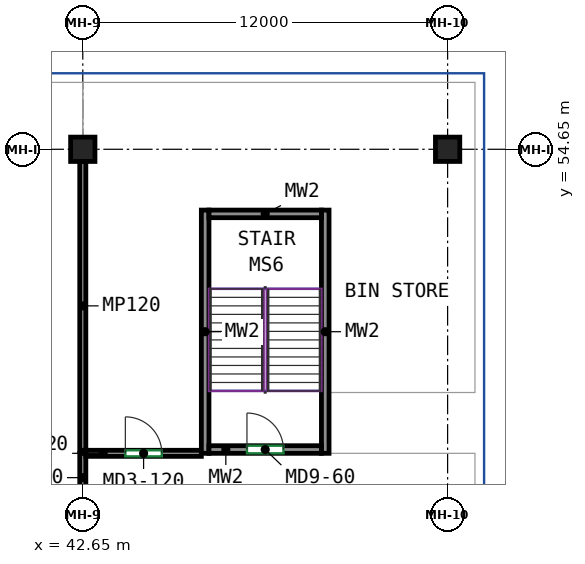
"""IFC4 building model, lengths in metres.
Left out: names, types, materials, properties, quantities, classifications, styles, units other than length and angle.
Written with IfcOpenShell. Run it as: python <this file> out.ifc"""

import sys

from ifc_helpers import new_model, si_unit, direction, frame, frame_2d, origin, origin_2d, place, context, subcontext, project, spatial, rectangle, extrude, source, transform, mapped, element, fill, save


model = new_model("IFC4")
c1 = context("Model", 3, precision=1e-05, world=origin(), true_north=direction((0.0, 1.0)))
c2 = subcontext(c1, "Body", "Model", "MODEL_VIEW")
j1 = project(units=[si_unit("LENGTHUNIT", "METRE"), si_unit("PLANEANGLEUNIT", "RADIAN")], contexts=[c1])
p1 = place(None, origin())
s1 = spatial("IfcSite", under=j1, at=p1, CompositionType="ELEMENT")
p2 = place(p1, origin())
s2 = spatial("IfcBuilding", under=s1, at=p2, CompositionType="ELEMENT")
p3 = place(p2, frame((0.0, 0.0, 9.0)))
s3 = spatial("IfcBuildingStorey", under=s2, at=p3, CompositionType="ELEMENT", Elevation=9.0)
m1 = source(origin(), c2, "Body", "SweptSolid", [
    extrude(rectangle(XDim=0.8, YDim=0.8, at=origin_2d()), origin(), (0.0, 0.0, 1.0), 4.1),
])
for number, where, z_axis, x_axis in (
    (1, (42.65, 54.65, 0.0), (0.0, 0.0, 1.0), (1.0, 0.0, 0.0)),
    (2, (54.65, 54.65, 0.0), (0.0, 0.0, 1.0), (1.0, 0.0, 0.0)),
):
    element("IfcColumn", number, at=place(p3, frame(where, z_axis=z_axis, x_axis=x_axis)), inside=s3, PredefinedType="COLUMN", context=c2, shape_type="MappedRepresentation", body=[
        mapped(m1, transform((0.0, 0.0, 0.0))),
    ])
m2 = source(origin(), c2, "Body", "SweptSolid", [
    extrude(rectangle(XDim=8.0, YDim=0.25, at=frame_2d((4.0, 0.0))), origin(), (0.0, 0.0, 1.0), 4.1),
])
for number, where, z_axis, x_axis in (
    (3, (46.675, 44.65, 0.0), (0.0, 0.0, 1.0), (0.0, 1.0, 0.0)),
    (4, (50.625, 44.65, 0.0), (0.0, 0.0, 1.0), (0.0, 1.0, 0.0)),
):
    element("IfcWall", number, at=place(p3, frame(where, z_axis=z_axis, x_axis=x_axis)), inside=s3, PredefinedType="SHEAR", context=c2, shape_type="MappedRepresentation", body=[
        mapped(m2, transform((0.0, 0.0, 0.0))),
    ])
m3 = source(origin(), c2, "Body", "SweptSolid", [
    extrude(rectangle(XDim=3.7, YDim=0.25, at=frame_2d((1.85, 0.0))), origin(), (0.0, 0.0, 1.0), 4.1),
])
p4 = place(p3, frame((46.8, 44.775, 0.0), z_axis=(0.0, 0.0, 1.0), x_axis=(1.0, 0.0, 0.0)))
e5 = element("IfcWall", 5, at=p4, inside=s3, PredefinedType="SHEAR", context=c2, shape_type="MappedRepresentation", body=[
    mapped(m3, transform((0.0, 0.0, 0.0))),
])
p5 = place(p4, frame((1.25, 0.0, 0.0)))
e6 = element("IfcOpeningElement", 6, at=p5, cuts=e5, PredefinedType="OPENING", context=c2, shape_type="SweptSolid", body=[
    extrude(rectangle(XDim=1.2, YDim=2.1, at=frame_2d((0.6, 1.05))), frame((0.0, 0.135, 0.0), z_axis=(0.0, -1.0, 0.0), x_axis=(1.0, 0.0, 0.0)), (0.0, 0.0, 1.0), 0.27),
])
p6 = place(p3, frame((46.8, 52.525, 0.0), z_axis=(0.0, 0.0, 1.0), x_axis=(1.0, 0.0, 0.0)))
e7 = element("IfcWall", 7, at=p6, inside=s3, PredefinedType="SHEAR", context=c2, shape_type="MappedRepresentation", body=[
    mapped(m3, transform((0.0, 0.0, 0.0))),
])
m4 = source(origin(), c2, "Body", "SweptSolid", [
    extrude(rectangle(XDim=112.7, YDim=0.3, at=frame_2d((56.35, 0.0))), origin(), (0.0, 0.0, 1.0), 4.1),
])
p7 = place(p3, frame((-56.85, 57.0, 0.0), z_axis=(0.0, 0.0, 1.0), x_axis=(1.0, 0.0, 0.0)))
e8 = element("IfcWall", 8, at=p7, inside=s3, PredefinedType="SOLIDWALL", context=c2, shape_type="MappedRepresentation", body=[
    mapped(m4, transform((0.0, 0.0, 0.0))),
])
p8 = place(p7, frame((3.15, 0.0, 0.9)))
e9 = element("IfcOpeningElement", 9, at=p8, cuts=e8, PredefinedType="OPENING", context=c2, shape_type="SweptSolid", body=[
    extrude(rectangle(XDim=2.4, YDim=1.8, at=frame_2d((1.2, 0.9))), frame((0.0, 0.16, 0.0), z_axis=(0.0, -1.0, 0.0), x_axis=(1.0, 0.0, 0.0)), (0.0, 0.0, 1.0), 0.32),
])
p9 = place(p7, frame((7.15, 0.0, 0.9)))
e10 = element("IfcOpeningElement", 10, at=p9, cuts=e8, PredefinedType="OPENING", context=c2, shape_type="SweptSolid", body=[
    extrude(rectangle(XDim=2.4, YDim=1.8, at=frame_2d((1.2, 0.9))), frame((0.0, 0.16, 0.0), z_axis=(0.0, -1.0, 0.0), x_axis=(1.0, 0.0, 0.0)), (0.0, 0.0, 1.0), 0.32),
])
p10 = place(p7, frame((11.15, 0.0, 0.9)))
e11 = element("IfcOpeningElement", 11, at=p10, cuts=e8, PredefinedType="OPENING", context=c2, shape_type="SweptSolid", body=[
    extrude(rectangle(XDim=2.4, YDim=1.8, at=frame_2d((1.2, 0.9))), frame((0.0, 0.16, 0.0), z_axis=(0.0, -1.0, 0.0), x_axis=(1.0, 0.0, 0.0)), (0.0, 0.0, 1.0), 0.32),
])
p11 = place(p7, frame((15.15, 0.0, 0.9)))
e12 = element("IfcOpeningElement", 12, at=p11, cuts=e8, PredefinedType="OPENING", context=c2, shape_type="SweptSolid", body=[
    extrude(rectangle(XDim=2.4, YDim=1.8, at=frame_2d((1.2, 0.9))), frame((0.0, 0.16, 0.0), z_axis=(0.0, -1.0, 0.0), x_axis=(1.0, 0.0, 0.0)), (0.0, 0.0, 1.0), 0.32),
])
p12 = place(p7, frame((19.15, 0.0, 0.9)))
e13 = element("IfcOpeningElement", 13, at=p12, cuts=e8, PredefinedType="OPENING", context=c2, shape_type="SweptSolid", body=[
    extrude(rectangle(XDim=2.4, YDim=1.8, at=frame_2d((1.2, 0.9))), frame((0.0, 0.16, 0.0), z_axis=(0.0, -1.0, 0.0), x_axis=(1.0, 0.0, 0.0)), (0.0, 0.0, 1.0), 0.32),
])
p13 = place(p7, frame((23.15, 0.0, 0.9)))
e14 = element("IfcOpeningElement", 14, at=p13, cuts=e8, PredefinedType="OPENING", context=c2, shape_type="SweptSolid", body=[
    extrude(rectangle(XDim=2.4, YDim=1.8, at=frame_2d((1.2, 0.9))), frame((0.0, 0.16, 0.0), z_axis=(0.0, -1.0, 0.0), x_axis=(1.0, 0.0, 0.0)), (0.0, 0.0, 1.0), 0.32),
])
p14 = place(p7, frame((27.15, 0.0, 0.9)))
e15 = element("IfcOpeningElement", 15, at=p14, cuts=e8, PredefinedType="OPENING", context=c2, shape_type="SweptSolid", body=[
    extrude(rectangle(XDim=2.4, YDim=1.8, at=frame_2d((1.2, 0.9))), frame((0.0, 0.16, 0.0), z_axis=(0.0, -1.0, 0.0), x_axis=(1.0, 0.0, 0.0)), (0.0, 0.0, 1.0), 0.32),
])
p15 = place(p7, frame((31.15, 0.0, 0.9)))
e16 = element("IfcOpeningElement", 16, at=p15, cuts=e8, PredefinedType="OPENING", context=c2, shape_type="SweptSolid", body=[
    extrude(rectangle(XDim=2.4, YDim=1.8, at=frame_2d((1.2, 0.9))), frame((0.0, 0.16, 0.0), z_axis=(0.0, -1.0, 0.0), x_axis=(1.0, 0.0, 0.0)), (0.0, 0.0, 1.0), 0.32),
])
p16 = place(p7, frame((35.15, 0.0, 0.9)))
e17 = element("IfcOpeningElement", 17, at=p16, cuts=e8, PredefinedType="OPENING", context=c2, shape_type="SweptSolid", body=[
    extrude(rectangle(XDim=2.4, YDim=1.8, at=frame_2d((1.2, 0.9))), frame((0.0, 0.16, 0.0), z_axis=(0.0, -1.0, 0.0), x_axis=(1.0, 0.0, 0.0)), (0.0, 0.0, 1.0), 0.32),
])
p17 = place(p7, frame((43.15, 0.0, 0.9)))
e18 = element("IfcOpeningElement", 18, at=p17, cuts=e8, PredefinedType="OPENING", context=c2, shape_type="SweptSolid", body=[
    extrude(rectangle(XDim=2.4, YDim=1.8, at=frame_2d((1.2, 0.9))), frame((0.0, 0.16, 0.0), z_axis=(0.0, -1.0, 0.0), x_axis=(1.0, 0.0, 0.0)), (0.0, 0.0, 1.0), 0.32),
])
p18 = place(p7, frame((47.15, 0.0, 0.9)))
e19 = element("IfcOpeningElement", 19, at=p18, cuts=e8, PredefinedType="OPENING", context=c2, shape_type="SweptSolid", body=[
    extrude(rectangle(XDim=2.4, YDim=1.8, at=frame_2d((1.2, 0.9))), frame((0.0, 0.16, 0.0), z_axis=(0.0, -1.0, 0.0), x_axis=(1.0, 0.0, 0.0)), (0.0, 0.0, 1.0), 0.32),
])
p19 = place(p7, frame((51.15, 0.0, 0.9)))
e20 = element("IfcOpeningElement", 20, at=p19, cuts=e8, PredefinedType="OPENING", context=c2, shape_type="SweptSolid", body=[
    extrude(rectangle(XDim=2.4, YDim=1.8, at=frame_2d((1.2, 0.9))), frame((0.0, 0.16, 0.0), z_axis=(0.0, -1.0, 0.0), x_axis=(1.0, 0.0, 0.0)), (0.0, 0.0, 1.0), 0.32),
])
p20 = place(p7, frame((55.15, 0.0, 0.9)))
e21 = element("IfcOpeningElement", 21, at=p20, cuts=e8, PredefinedType="OPENING", context=c2, shape_type="SweptSolid", body=[
    extrude(rectangle(XDim=2.4, YDim=1.8, at=frame_2d((1.2, 0.9))), frame((0.0, 0.16, 0.0), z_axis=(0.0, -1.0, 0.0), x_axis=(1.0, 0.0, 0.0)), (0.0, 0.0, 1.0), 0.32),
])
p21 = place(p7, frame((59.15, 0.0, 0.9)))
e22 = element("IfcOpeningElement", 22, at=p21, cuts=e8, PredefinedType="OPENING", context=c2, shape_type="SweptSolid", body=[
    extrude(rectangle(XDim=2.4, YDim=1.8, at=frame_2d((1.2, 0.9))), frame((0.0, 0.16, 0.0), z_axis=(0.0, -1.0, 0.0), x_axis=(1.0, 0.0, 0.0)), (0.0, 0.0, 1.0), 0.32),
])
p22 = place(p7, frame((63.15, 0.0, 0.9)))
e23 = element("IfcOpeningElement", 23, at=p22, cuts=e8, PredefinedType="OPENING", context=c2, shape_type="SweptSolid", body=[
    extrude(rectangle(XDim=2.4, YDim=1.8, at=frame_2d((1.2, 0.9))), frame((0.0, 0.16, 0.0), z_axis=(0.0, -1.0, 0.0), x_axis=(1.0, 0.0, 0.0)), (0.0, 0.0, 1.0), 0.32),
])
p23 = place(p7, frame((67.15, 0.0, 0.9)))
e24 = element("IfcOpeningElement", 24, at=p23, cuts=e8, PredefinedType="OPENING", context=c2, shape_type="SweptSolid", body=[
    extrude(rectangle(XDim=2.4, YDim=1.8, at=frame_2d((1.2, 0.9))), frame((0.0, 0.16, 0.0), z_axis=(0.0, -1.0, 0.0), x_axis=(1.0, 0.0, 0.0)), (0.0, 0.0, 1.0), 0.32),
])
p24 = place(p7, frame((71.15, 0.0, 0.9)))
e25 = element("IfcOpeningElement", 25, at=p24, cuts=e8, PredefinedType="OPENING", context=c2, shape_type="SweptSolid", body=[
    extrude(rectangle(XDim=2.4, YDim=1.8, at=frame_2d((1.2, 0.9))), frame((0.0, 0.16, 0.0), z_axis=(0.0, -1.0, 0.0), x_axis=(1.0, 0.0, 0.0)), (0.0, 0.0, 1.0), 0.32),
])
p25 = place(p7, frame((75.15, 0.0, 0.9)))
e26 = element("IfcOpeningElement", 26, at=p25, cuts=e8, PredefinedType="OPENING", context=c2, shape_type="SweptSolid", body=[
    extrude(rectangle(XDim=2.4, YDim=1.8, at=frame_2d((1.2, 0.9))), frame((0.0, 0.16, 0.0), z_axis=(0.0, -1.0, 0.0), x_axis=(1.0, 0.0, 0.0)), (0.0, 0.0, 1.0), 0.32),
])
p26 = place(p7, frame((79.15, 0.0, 0.9)))
e27 = element("IfcOpeningElement", 27, at=p26, cuts=e8, PredefinedType="OPENING", context=c2, shape_type="SweptSolid", body=[
    extrude(rectangle(XDim=2.4, YDim=1.8, at=frame_2d((1.2, 0.9))), frame((0.0, 0.16, 0.0), z_axis=(0.0, -1.0, 0.0), x_axis=(1.0, 0.0, 0.0)), (0.0, 0.0, 1.0), 0.32),
])
p27 = place(p7, frame((83.15, 0.0, 0.9)))
e28 = element("IfcOpeningElement", 28, at=p27, cuts=e8, PredefinedType="OPENING", context=c2, shape_type="SweptSolid", body=[
    extrude(rectangle(XDim=2.4, YDim=1.8, at=frame_2d((1.2, 0.9))), frame((0.0, 0.16, 0.0), z_axis=(0.0, -1.0, 0.0), x_axis=(1.0, 0.0, 0.0)), (0.0, 0.0, 1.0), 0.32),
])
p28 = place(p7, frame((87.15, 0.0, 0.9)))
e29 = element("IfcOpeningElement", 29, at=p28, cuts=e8, PredefinedType="OPENING", context=c2, shape_type="SweptSolid", body=[
    extrude(rectangle(XDim=2.4, YDim=1.8, at=frame_2d((1.2, 0.9))), frame((0.0, 0.16, 0.0), z_axis=(0.0, -1.0, 0.0), x_axis=(1.0, 0.0, 0.0)), (0.0, 0.0, 1.0), 0.32),
])
p29 = place(p7, frame((91.15, 0.0, 0.9)))
e30 = element("IfcOpeningElement", 30, at=p29, cuts=e8, PredefinedType="OPENING", context=c2, shape_type="SweptSolid", body=[
    extrude(rectangle(XDim=2.4, YDim=1.8, at=frame_2d((1.2, 0.9))), frame((0.0, 0.16, 0.0), z_axis=(0.0, -1.0, 0.0), x_axis=(1.0, 0.0, 0.0)), (0.0, 0.0, 1.0), 0.32),
])
p30 = place(p7, frame((95.15, 0.0, 0.9)))
e31 = element("IfcOpeningElement", 31, at=p30, cuts=e8, PredefinedType="OPENING", context=c2, shape_type="SweptSolid", body=[
    extrude(rectangle(XDim=2.4, YDim=1.8, at=frame_2d((1.2, 0.9))), frame((0.0, 0.16, 0.0), z_axis=(0.0, -1.0, 0.0), x_axis=(1.0, 0.0, 0.0)), (0.0, 0.0, 1.0), 0.32),
])
p31 = place(p7, frame((103.15, 0.0, 0.9)))
e32 = element("IfcOpeningElement", 32, at=p31, cuts=e8, PredefinedType="OPENING", context=c2, shape_type="SweptSolid", body=[
    extrude(rectangle(XDim=2.4, YDim=1.8, at=frame_2d((1.2, 0.9))), frame((0.0, 0.16, 0.0), z_axis=(0.0, -1.0, 0.0), x_axis=(1.0, 0.0, 0.0)), (0.0, 0.0, 1.0), 0.32),
])
p32 = place(p7, frame((107.15, 0.0, 0.9)))
e33 = element("IfcOpeningElement", 33, at=p32, cuts=e8, PredefinedType="OPENING", context=c2, shape_type="SweptSolid", body=[
    extrude(rectangle(XDim=2.4, YDim=1.8, at=frame_2d((1.2, 0.9))), frame((0.0, 0.16, 0.0), z_axis=(0.0, -1.0, 0.0), x_axis=(1.0, 0.0, 0.0)), (0.0, 0.0, 1.0), 0.32),
])
m5 = source(origin(), c2, "Body", "SweptSolid", [
    extrude(rectangle(XDim=28.7, YDim=0.3, at=frame_2d((14.35, 0.0))), origin(), (0.0, 0.0, 1.0), 4.1),
])
p33 = place(p3, frame((55.7, 56.85, 0.0), z_axis=(0.0, 0.0, 1.0), x_axis=(0.0, -1.0, 0.0)))
e34 = element("IfcWall", 34, at=p33, inside=s3, PredefinedType="SOLIDWALL", context=c2, shape_type="MappedRepresentation", body=[
    mapped(m5, transform((0.0, 0.0, 0.0))),
])
p34 = place(p33, frame((3.15, 0.0, 0.9)))
e35 = element("IfcOpeningElement", 35, at=p34, cuts=e34, PredefinedType="OPENING", context=c2, shape_type="SweptSolid", body=[
    extrude(rectangle(XDim=2.4, YDim=1.8, at=frame_2d((1.2, 0.9))), frame((0.0, 0.16, 0.0), z_axis=(0.0, -1.0, 0.0), x_axis=(1.0, 0.0, 0.0)), (0.0, 0.0, 1.0), 0.32),
])
p35 = place(p33, frame((7.15, 0.0, 0.9)))
e36 = element("IfcOpeningElement", 36, at=p35, cuts=e34, PredefinedType="OPENING", context=c2, shape_type="SweptSolid", body=[
    extrude(rectangle(XDim=2.4, YDim=1.8, at=frame_2d((1.2, 0.9))), frame((0.0, 0.16, 0.0), z_axis=(0.0, -1.0, 0.0), x_axis=(1.0, 0.0, 0.0)), (0.0, 0.0, 1.0), 0.32),
])
p36 = place(p33, frame((11.15, 0.0, 0.9)))
e37 = element("IfcOpeningElement", 37, at=p36, cuts=e34, PredefinedType="OPENING", context=c2, shape_type="SweptSolid", body=[
    extrude(rectangle(XDim=2.4, YDim=1.8, at=frame_2d((1.2, 0.9))), frame((0.0, 0.16, 0.0), z_axis=(0.0, -1.0, 0.0), x_axis=(1.0, 0.0, 0.0)), (0.0, 0.0, 1.0), 0.32),
])
p37 = place(p33, frame((15.15, 0.0, 0.9)))
e38 = element("IfcOpeningElement", 38, at=p37, cuts=e34, PredefinedType="OPENING", context=c2, shape_type="SweptSolid", body=[
    extrude(rectangle(XDim=2.4, YDim=1.8, at=frame_2d((1.2, 0.9))), frame((0.0, 0.16, 0.0), z_axis=(0.0, -1.0, 0.0), x_axis=(1.0, 0.0, 0.0)), (0.0, 0.0, 1.0), 0.32),
])
p38 = place(p33, frame((19.15, 0.0, 0.9)))
e39 = element("IfcOpeningElement", 39, at=p38, cuts=e34, PredefinedType="OPENING", context=c2, shape_type="SweptSolid", body=[
    extrude(rectangle(XDim=2.4, YDim=1.8, at=frame_2d((1.2, 0.9))), frame((0.0, 0.16, 0.0), z_axis=(0.0, -1.0, 0.0), x_axis=(1.0, 0.0, 0.0)), (0.0, 0.0, 1.0), 0.32),
])
p39 = place(p33, frame((23.15, 0.0, 0.9)))
e40 = element("IfcOpeningElement", 40, at=p39, cuts=e34, PredefinedType="OPENING", context=c2, shape_type="SweptSolid", body=[
    extrude(rectangle(XDim=2.4, YDim=1.8, at=frame_2d((1.2, 0.9))), frame((0.0, 0.16, 0.0), z_axis=(0.0, -1.0, 0.0), x_axis=(1.0, 0.0, 0.0)), (0.0, 0.0, 1.0), 0.32),
])
m6 = source(origin(), c2, "Body", "SweptSolid", [
    extrude(rectangle(XDim=1.6, YDim=0.2, at=frame_2d((0.8, 0.0))), origin(), (0.0, 0.0, 1.0), 3.2),
])
p40 = place(p3, frame((42.65, 43.05, 0.0), z_axis=(0.0, 0.0, 1.0), x_axis=(0.0, 1.0, 0.0)))
e41 = element("IfcWall", 41, at=p40, inside=s3, PredefinedType="PARTITIONING", context=c2, shape_type="MappedRepresentation", body=[
    mapped(m6, transform((0.0, 0.0, 0.0))),
])
m7 = source(origin(), c2, "Body", "SweptSolid", [
    extrude(rectangle(XDim=3.8, YDim=0.2, at=frame_2d((1.9, 0.0))), origin(), (0.0, 0.0, 1.0), 3.2),
])
p41 = place(p3, frame((42.75, 44.65, 0.0), z_axis=(0.0, 0.0, 1.0), x_axis=(1.0, 0.0, 0.0)))
e42 = element("IfcWall", 42, at=p41, inside=s3, PredefinedType="PARTITIONING", context=c2, shape_type="MappedRepresentation", body=[
    mapped(m7, transform((0.0, 0.0, 0.0))),
])
p42 = place(p41, frame((1.3, 0.0, 0.0)))
e43 = element("IfcOpeningElement", 43, at=p42, cuts=e42, PredefinedType="OPENING", context=c2, shape_type="SweptSolid", body=[
    extrude(rectangle(XDim=1.2, YDim=2.1, at=frame_2d((0.6, 1.05))), frame((0.0, 0.11, 0.0), z_axis=(0.0, -1.0, 0.0), x_axis=(1.0, 0.0, 0.0)), (0.0, 0.0, 1.0), 0.22),
])
m8 = source(origin(), c2, "Body", "SweptSolid", [
    extrude(rectangle(XDim=9.5, YDim=0.2, at=frame_2d((4.75, 0.0))), origin(), (0.0, 0.0, 1.0), 3.2),
])
p43 = place(p3, frame((42.65, 54.25, 0.0), z_axis=(0.0, 0.0, 1.0), x_axis=(0.0, -1.0, 0.0)))
e44 = element("IfcWall", 44, at=p43, inside=s3, PredefinedType="PARTITIONING", context=c2, shape_type="MappedRepresentation", body=[
    mapped(m8, transform((0.0, 0.0, 0.0))),
])
m9 = source(origin(), c2, "Body", "SweptSolid", [
    extrude(rectangle(XDim=1.8, YDim=0.2, at=frame_2d((0.9, 0.0))), origin(), (0.0, 0.0, 1.0), 4.1),
])
p44 = place(p3, frame((42.65, 56.85, 0.0), z_axis=(0.0, 0.0, 1.0), x_axis=(0.0, -1.0, 0.0)))
e45 = element("IfcWall", 45, at=p44, inside=s3, PredefinedType="PARTITIONING", context=c2, shape_type="MappedRepresentation", body=[
    mapped(m9, transform((0.0, 0.0, 0.0))),
])
p45 = place(p31, origin())
e46 = element("IfcWindow", 46, at=p45, inside=s3, PartitioningType="SINGLE_PANEL", PredefinedType="WINDOW", context=c2, shape_type="SweptSolid", body=[
    extrude(rectangle(XDim=2.4, YDim=1.8, at=frame_2d((1.2, 0.9))), frame((0.0, 0.03, 0.0), z_axis=(0.0, -1.0, 0.0), x_axis=(1.0, 0.0, 0.0)), (0.0, 0.0, 1.0), 0.06),
])
fill(e32, e46)
p46 = place(p32, origin())
e47 = element("IfcWindow", 47, at=p46, inside=s3, PartitioningType="SINGLE_PANEL", PredefinedType="WINDOW", context=c2, shape_type="SweptSolid", body=[
    extrude(rectangle(XDim=2.4, YDim=1.8, at=frame_2d((1.2, 0.9))), frame((0.0, 0.03, 0.0), z_axis=(0.0, -1.0, 0.0), x_axis=(1.0, 0.0, 0.0)), (0.0, 0.0, 1.0), 0.06),
])
fill(e33, e47)
p47 = place(p34, origin())
e48 = element("IfcWindow", 48, at=p47, inside=s3, PartitioningType="SINGLE_PANEL", PredefinedType="WINDOW", context=c2, shape_type="SweptSolid", body=[
    extrude(rectangle(XDim=2.4, YDim=1.8, at=frame_2d((1.2, 0.9))), frame((0.0, 0.03, 0.0), z_axis=(0.0, -1.0, 0.0), x_axis=(1.0, 0.0, 0.0)), (0.0, 0.0, 1.0), 0.06),
])
fill(e35, e48)
p48 = place(p35, origin())
e49 = element("IfcWindow", 49, at=p48, inside=s3, PartitioningType="SINGLE_PANEL", PredefinedType="WINDOW", context=c2, shape_type="SweptSolid", body=[
    extrude(rectangle(XDim=2.4, YDim=1.8, at=frame_2d((1.2, 0.9))), frame((0.0, 0.03, 0.0), z_axis=(0.0, -1.0, 0.0), x_axis=(1.0, 0.0, 0.0)), (0.0, 0.0, 1.0), 0.06),
])
fill(e36, e49)
p49 = place(p36, origin())
e50 = element("IfcWindow", 50, at=p49, inside=s3, PartitioningType="SINGLE_PANEL", PredefinedType="WINDOW", context=c2, shape_type="SweptSolid", body=[
    extrude(rectangle(XDim=2.4, YDim=1.8, at=frame_2d((1.2, 0.9))), frame((0.0, 0.03, 0.0), z_axis=(0.0, -1.0, 0.0), x_axis=(1.0, 0.0, 0.0)), (0.0, 0.0, 1.0), 0.06),
])
fill(e37, e50)
p50 = place(p5, origin())
e51 = element("IfcDoor", 51, at=p50, inside=s3, OperationType="DOUBLE_DOOR_SINGLE_SWING", PredefinedType="DOOR", context=c2, shape_type="SweptSolid", body=[
    extrude(rectangle(XDim=1.2, YDim=2.1, at=frame_2d((0.6, 1.05))), frame((0.0, 0.025, 0.0), z_axis=(0.0, -1.0, 0.0), x_axis=(1.0, 0.0, 0.0)), (0.0, 0.0, 1.0), 0.05),
])
fill(e6, e51)
p51 = place(p42, origin())
e52 = element("IfcDoor", 52, at=p51, inside=s3, OperationType="SINGLE_SWING_LEFT", PredefinedType="DOOR", context=c2, shape_type="SweptSolid", body=[
    extrude(rectangle(XDim=1.2, YDim=2.1, at=frame_2d((0.6, 1.05))), frame((0.0, 0.025, 0.0), z_axis=(0.0, -1.0, 0.0), x_axis=(1.0, 0.0, 0.0)), (0.0, 0.0, 1.0), 0.05),
])
fill(e43, e52)
save(model, sys.argv[1])
